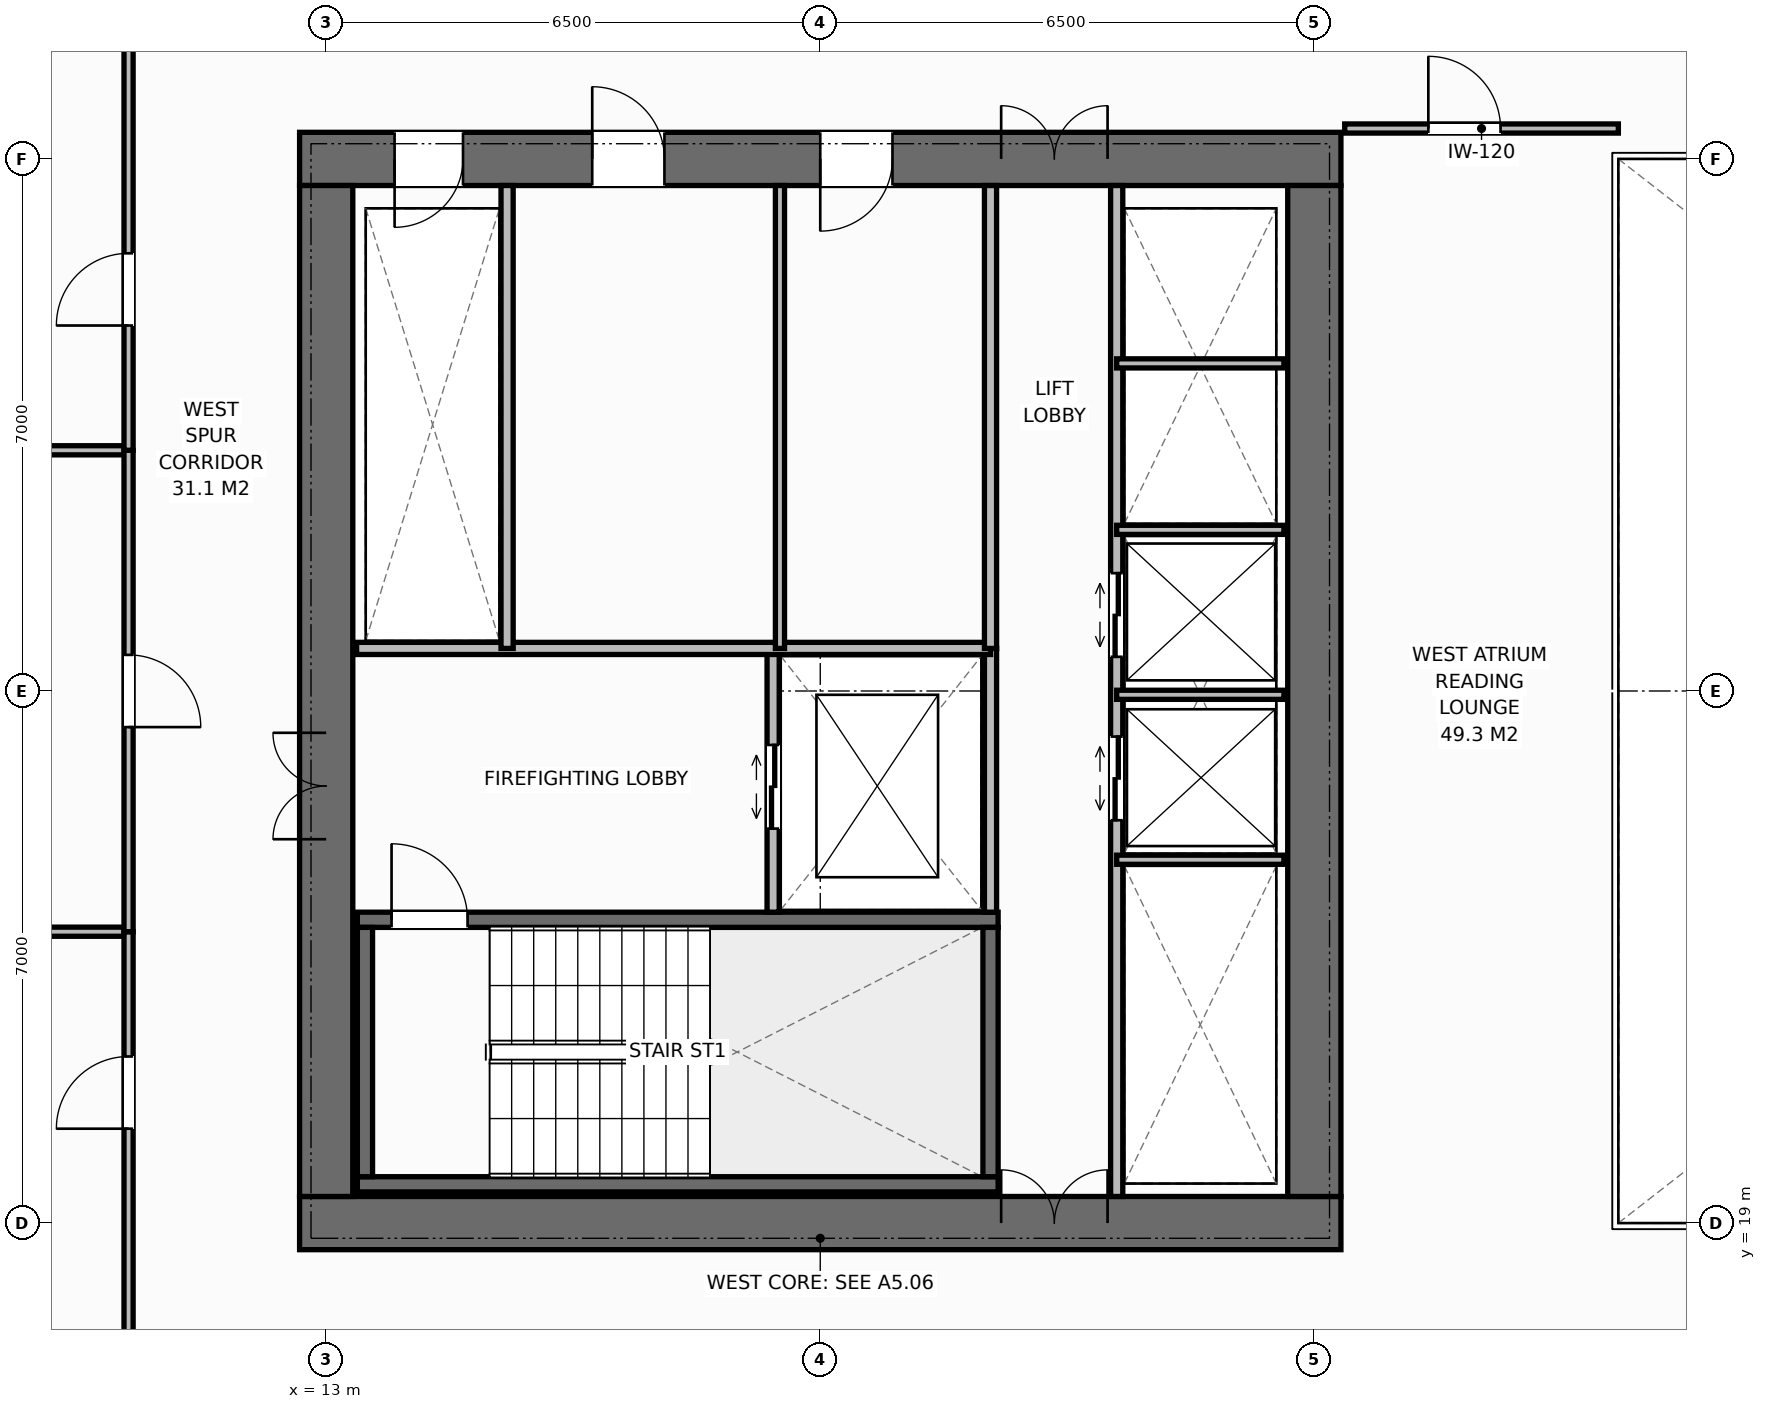
"""IFC4 building model, lengths in metres.
Left out: names, types, materials, properties, quantities, classifications, styles, units other than length and angle.
Written with IfcOpenShell. Run it as: python <this file> out.ifc"""

import sys

from ifc_helpers import new_model, si_unit, direction, frame, frame_2d, origin, place, context, subcontext, project, spatial, rectangle, extrude, element, fill, save


model = new_model("IFC4")
c1 = context("Model", 3, precision=1e-05, world=origin(), true_north=direction((0.0, 1.0)))
c2 = subcontext(c1, "Body", "Model", "MODEL_VIEW")
j1 = project(units=[si_unit("LENGTHUNIT", "METRE"), si_unit("PLANEANGLEUNIT", "RADIAN")], contexts=[c1])
p1 = place(None, origin())
s1 = spatial("IfcSite", under=j1, at=p1, CompositionType="ELEMENT")
p2 = place(p1, origin())
s2 = spatial("IfcBuilding", under=s1, at=p2, CompositionType="ELEMENT")
p3 = place(p2, frame((0.0, 0.0, 89.8)))
s3 = spatial("IfcBuildingStorey", under=s2, at=p3, CompositionType="ELEMENT", Elevation=89.8)
p4 = place(p3, frame((12.65, 19.0, 0.0), z_axis=(0.0, 0.0, 1.0), x_axis=(1.0, 0.0, 0.0)))
e1 = element("IfcWall", 1, at=p4, inside=s3, PredefinedType="SHEAR", context=c2, shape_type="SweptSolid", body=[
    extrude(rectangle(XDim=13.7, YDim=0.7, at=frame_2d((6.85, 0.0))), origin(), (0.0, 0.0, 1.0), 3.8),
])
p5 = place(p4, frame((9.23, 0.0, 0.0)))
e2 = element("IfcOpeningElement", 2, at=p5, cuts=e1, PredefinedType="OPENING", context=c2, shape_type="SweptSolid", body=[
    extrude(rectangle(XDim=1.4, YDim=2.2, at=frame_2d((0.7, 1.1))), frame((0.0, 0.36, 0.0), z_axis=(0.0, -1.0, 0.0), x_axis=(1.0, 0.0, 0.0)), (0.0, 0.0, 1.0), 0.72),
])
p6 = place(p3, frame((12.65, 33.0, 0.0), z_axis=(0.0, 0.0, 1.0), x_axis=(1.0, 0.0, 0.0)))
e3 = element("IfcWall", 3, at=p6, inside=s3, PredefinedType="SHEAR", context=c2, shape_type="SweptSolid", body=[
    extrude(rectangle(XDim=13.7, YDim=0.7, at=frame_2d((6.85, 0.0))), origin(), (0.0, 0.0, 1.0), 3.8),
])
p7 = place(p6, frame((1.25, 0.0, 0.0)))
e4 = element("IfcOpeningElement", 4, at=p7, cuts=e3, PredefinedType="OPENING", context=c2, shape_type="SweptSolid", body=[
    extrude(rectangle(XDim=0.9, YDim=2.15, at=frame_2d((0.45, 1.075))), frame((0.0, 0.36, 0.0), z_axis=(0.0, -1.0, 0.0), x_axis=(1.0, 0.0, 0.0)), (0.0, 0.0, 1.0), 0.72),
])
p8 = place(p6, frame((3.85, 0.0, 0.0)))
e5 = element("IfcOpeningElement", 5, at=p8, cuts=e3, PredefinedType="OPENING", context=c2, shape_type="SweptSolid", body=[
    extrude(rectangle(XDim=0.95, YDim=2.15, at=frame_2d((0.475, 1.075))), frame((0.0, 0.36, 0.0), z_axis=(0.0, -1.0, 0.0), x_axis=(1.0, 0.0, 0.0)), (0.0, 0.0, 1.0), 0.72),
])
p9 = place(p6, frame((6.85, 0.0, 0.0)))
e6 = element("IfcOpeningElement", 6, at=p9, cuts=e3, PredefinedType="OPENING", context=c2, shape_type="SweptSolid", body=[
    extrude(rectangle(XDim=0.95, YDim=2.15, at=frame_2d((0.475, 1.075))), frame((0.0, 0.36, 0.0), z_axis=(0.0, -1.0, 0.0), x_axis=(1.0, 0.0, 0.0)), (0.0, 0.0, 1.0), 0.72),
])
p10 = place(p6, frame((9.23, 0.0, 0.0)))
e7 = element("IfcOpeningElement", 7, at=p10, cuts=e3, PredefinedType="OPENING", context=c2, shape_type="SweptSolid", body=[
    extrude(rectangle(XDim=1.4, YDim=2.2, at=frame_2d((0.7, 1.1))), frame((0.0, 0.36, 0.0), z_axis=(0.0, -1.0, 0.0), x_axis=(1.0, 0.0, 0.0)), (0.0, 0.0, 1.0), 0.72),
])
p11 = place(p3, frame((13.0, 19.35, 0.0), z_axis=(0.0, 0.0, 1.0), x_axis=(0.0, 1.0, 0.0)))
e8 = element("IfcWall", 8, at=p11, inside=s3, PredefinedType="SHEAR", context=c2, shape_type="SweptSolid", body=[
    extrude(rectangle(XDim=13.3, YDim=0.7, at=frame_2d((6.65, 0.0))), origin(), (0.0, 0.0, 1.0), 3.8),
])
p12 = place(p11, frame((4.7, 0.0, 0.0)))
e9 = element("IfcOpeningElement", 9, at=p12, cuts=e8, PredefinedType="OPENING", context=c2, shape_type="SweptSolid", body=[
    extrude(rectangle(XDim=1.4, YDim=2.2, at=frame_2d((0.7, 1.1))), frame((0.0, 0.36, 0.0), z_axis=(0.0, -1.0, 0.0), x_axis=(1.0, 0.0, 0.0)), (0.0, 0.0, 1.0), 0.72),
])
p13 = place(p3, frame((26.0, 19.35, 0.0), z_axis=(0.0, 0.0, 1.0), x_axis=(0.0, 1.0, 0.0)))
e10 = element("IfcWall", 10, at=p13, inside=s3, PredefinedType="SHEAR", context=c2, shape_type="SweptSolid", body=[
    extrude(rectangle(XDim=13.3, YDim=0.7, at=frame_2d((6.65, 0.0))), origin(), (0.0, 0.0, 1.0), 3.8),
])
p14 = place(p3, frame((13.41, 19.51, 0.0), z_axis=(0.0, 0.0, 1.0), x_axis=(1.0, 0.0, 0.0)))
e11 = element("IfcWall", 11, at=p14, inside=s3, PredefinedType="SHEAR", context=c2, shape_type="SweptSolid", body=[
    extrude(rectangle(XDim=8.43, YDim=0.2, at=frame_2d((4.215, 0.0))), origin(), (0.0, 0.0, 1.0), 3.8),
])
p15 = place(p3, frame((13.41, 22.99, 0.0), z_axis=(0.0, 0.0, 1.0), x_axis=(1.0, 0.0, 0.0)))
e12 = element("IfcWall", 12, at=p15, inside=s3, PredefinedType="SHEAR", context=c2, shape_type="SweptSolid", body=[
    extrude(rectangle(XDim=8.43, YDim=0.2, at=frame_2d((4.215, 0.0))), origin(), (0.0, 0.0, 1.0), 3.8),
])
p16 = place(p15, frame((0.45, 0.0, 0.0)))
e13 = element("IfcOpeningElement", 13, at=p16, cuts=e12, PredefinedType="OPENING", context=c2, shape_type="SweptSolid", body=[
    extrude(rectangle(XDim=1.0, YDim=2.15, at=frame_2d((0.5, 1.075))), frame((0.0, 0.11, 0.0), z_axis=(0.0, -1.0, 0.0), x_axis=(1.0, 0.0, 0.0)), (0.0, 0.0, 1.0), 0.22),
])
for number, where, z_axis, x_axis in (
    (14, (13.51, 19.61, 0.0), (0.0, 0.0, 1.0), (0.0, 1.0, 0.0)),
    (15, (21.74, 19.61, 0.0), (0.0, 0.0, 1.0), (0.0, 1.0, 0.0)),
):
    element("IfcWall", number, at=place(p3, frame(where, z_axis=z_axis, x_axis=x_axis)), inside=s3, PredefinedType="SHEAR", context=c2, shape_type="SweptSolid", body=[
        extrude(rectangle(XDim=3.28, YDim=0.2, at=frame_2d((1.64, 0.0))), origin(), (0.0, 0.0, 1.0), 3.8),
    ])
p17 = place(p3, frame((21.74, 23.09, 0.0), z_axis=(0.0, 0.0, 1.0), x_axis=(0.0, 1.0, 0.0)))
e16 = element("IfcWall", 16, at=p17, inside=s3, PredefinedType="STANDARD", context=c2, shape_type="SweptSolid", body=[
    extrude(rectangle(XDim=3.47, YDim=0.16, at=frame_2d((1.735, 0.0))), origin(), (0.0, 0.0, 1.0), 3.565),
])
p18 = place(p3, frame((18.88, 23.09, 0.0), z_axis=(0.0, 0.0, 1.0), x_axis=(0.0, 1.0, 0.0)))
e17 = element("IfcWall", 17, at=p18, inside=s3, PredefinedType="STANDARD", context=c2, shape_type="SweptSolid", body=[
    extrude(rectangle(XDim=3.47, YDim=0.16, at=frame_2d((1.735, 0.0))), origin(), (0.0, 0.0, 1.0), 3.565),
])
p19 = place(p18, frame((1.1, 0.0, 0.0)))
e18 = element("IfcOpeningElement", 18, at=p19, cuts=e17, PredefinedType="OPENING", context=c2, shape_type="SweptSolid", body=[
    extrude(rectangle(XDim=1.1, YDim=2.2, at=frame_2d((0.55, 1.1))), frame((0.0, 0.09, 0.0), z_axis=(0.0, -1.0, 0.0), x_axis=(1.0, 0.0, 0.0)), (0.0, 0.0, 1.0), 0.18),
])
p20 = place(p3, frame((13.4, 26.56, 0.0), z_axis=(0.0, 0.0, 1.0), x_axis=(1.0, 0.0, 0.0)))
e19 = element("IfcWall", 19, at=p20, inside=s3, PredefinedType="STANDARD", context=c2, shape_type="SweptSolid", body=[
    extrude(rectangle(XDim=8.34, YDim=0.16, at=frame_2d((4.17, 0.0))), origin(), (0.0, 0.0, 1.0), 3.565),
])
p21 = place(p3, frame((15.38, 26.56, 0.0), z_axis=(0.0, 0.0, 1.0), x_axis=(0.0, 1.0, 0.0)))
e20 = element("IfcWall", 20, at=p21, inside=s3, PredefinedType="STANDARD", context=c2, shape_type="SweptSolid", body=[
    extrude(rectangle(XDim=6.09, YDim=0.16, at=frame_2d((3.045, 0.0))), origin(), (0.0, 0.0, 1.0), 3.565),
])
p22 = place(p3, frame((18.97, 26.56, 0.0), z_axis=(0.0, 0.0, 1.0), x_axis=(0.0, 1.0, 0.0)))
e21 = element("IfcWall", 21, at=p22, inside=s3, PredefinedType="PARTITIONING", context=c2, shape_type="SweptSolid", body=[
    extrude(rectangle(XDim=6.09, YDim=0.12, at=frame_2d((3.045, 0.0))), origin(), (0.0, 0.0, 1.0), 3.565),
])
p23 = place(p3, frame((21.74, 26.56, 0.0), z_axis=(0.0, 0.0, 1.0), x_axis=(0.0, 1.0, 0.0)))
e22 = element("IfcWall", 22, at=p23, inside=s3, PredefinedType="STANDARD", context=c2, shape_type="SweptSolid", body=[
    extrude(rectangle(XDim=6.09, YDim=0.16, at=frame_2d((3.045, 0.0))), origin(), (0.0, 0.0, 1.0), 3.565),
])
p24 = place(p3, frame((23.4, 19.35, 0.0), z_axis=(0.0, 0.0, 1.0), x_axis=(0.0, 1.0, 0.0)))
e23 = element("IfcWall", 23, at=p24, inside=s3, PredefinedType="STANDARD", context=c2, shape_type="SweptSolid", body=[
    extrude(rectangle(XDim=13.3, YDim=0.16, at=frame_2d((6.65, 0.0))), origin(), (0.0, 0.0, 1.0), 3.565),
])
p25 = place(p24, frame((4.95, 0.0, 0.0)))
e24 = element("IfcOpeningElement", 24, at=p25, cuts=e23, PredefinedType="OPENING", context=c2, shape_type="SweptSolid", body=[
    extrude(rectangle(XDim=1.1, YDim=2.2, at=frame_2d((0.55, 1.1))), frame((0.0, 0.09, 0.0), z_axis=(0.0, -1.0, 0.0), x_axis=(1.0, 0.0, 0.0)), (0.0, 0.0, 1.0), 0.18),
])
p26 = place(p24, frame((7.1, 0.0, 0.0)))
e25 = element("IfcOpeningElement", 25, at=p26, cuts=e23, PredefinedType="OPENING", context=c2, shape_type="SweptSolid", body=[
    extrude(rectangle(XDim=1.1, YDim=2.2, at=frame_2d((0.55, 1.1))), frame((0.0, 0.09, 0.0), z_axis=(0.0, -1.0, 0.0), x_axis=(1.0, 0.0, 0.0)), (0.0, 0.0, 1.0), 0.18),
])
for number, where, z_axis, x_axis in (
    (26, (23.4, 23.78, 0.0), (0.0, 0.0, 1.0), (1.0, 0.0, 0.0)),
    (27, (23.4, 25.95, 0.0), (0.0, 0.0, 1.0), (1.0, 0.0, 0.0)),
    (28, (23.4, 28.12, 0.0), (0.0, 0.0, 1.0), (1.0, 0.0, 0.0)),
    (29, (23.4, 30.31, 0.0), (0.0, 0.0, 1.0), (1.0, 0.0, 0.0)),
):
    element("IfcWall", number, at=place(p3, frame(where, z_axis=z_axis, x_axis=x_axis)), inside=s3, PredefinedType="PARTITIONING", context=c2, shape_type="SweptSolid", body=[
        extrude(rectangle(XDim=2.2, YDim=0.12, at=frame_2d((1.1, 0.0))), origin(), (0.0, 0.0, 1.0), 3.565),
    ])
p27 = place(p3, frame((26.4, 33.4, 0.0), z_axis=(0.0, 0.0, 1.0), x_axis=(1.0, 0.0, 0.0)))
e30 = element("IfcWall", 30, at=p27, inside=s3, PredefinedType="PARTITIONING", context=c2, shape_type="SweptSolid", body=[
    extrude(rectangle(XDim=3.6, YDim=0.12, at=frame_2d((1.8, 0.0))), origin(), (0.0, 0.0, 1.0), 3.565),
])
p28 = place(p27, frame((1.1, 0.0, 0.0)))
e31 = element("IfcOpeningElement", 31, at=p28, cuts=e30, PredefinedType="OPENING", context=c2, shape_type="SweptSolid", body=[
    extrude(rectangle(XDim=0.95, YDim=2.15, at=frame_2d((0.475, 1.075))), frame((0.0, 0.07, 0.0), z_axis=(0.0, -1.0, 0.0), x_axis=(1.0, 0.0, 0.0)), (0.0, 0.0, 1.0), 0.14),
])
p29 = place(p3, frame((1.82, 22.833, 0.0), z_axis=(0.0, 0.0, 1.0), x_axis=(1.0, 0.0, 0.0)))
e32 = element("IfcWall", 32, at=p29, inside=s3, PredefinedType="PARTITIONING", context=c2, shape_type="SweptSolid", body=[
    extrude(rectangle(XDim=8.58, YDim=0.12, at=frame_2d((4.29, 0.0))), origin(), (0.0, 0.0, 1.0), 3.565),
])
p30 = place(p3, frame((10.4, 16.5, 0.0), z_axis=(0.0, 0.0, 1.0), x_axis=(0.0, 1.0, 0.0)))
e33 = element("IfcWall", 33, at=p30, inside=s3, PredefinedType="PARTITIONING", context=c2, shape_type="SweptSolid", body=[
    extrude(rectangle(XDim=6.333, YDim=0.12, at=frame_2d((3.167, 0.0))), origin(), (0.0, 0.0, 1.0), 3.565),
])
p31 = place(p30, frame((3.742, 0.0, 0.0)))
e34 = element("IfcOpeningElement", 34, at=p31, cuts=e33, PredefinedType="OPENING", context=c2, shape_type="SweptSolid", body=[
    extrude(rectangle(XDim=0.95, YDim=2.15, at=frame_2d((0.475, 1.075))), frame((0.0, 0.07, 0.0), z_axis=(0.0, -1.0, 0.0), x_axis=(1.0, 0.0, 0.0)), (0.0, 0.0, 1.0), 0.14),
])
p32 = place(p3, frame((1.82, 29.167, 0.0), z_axis=(0.0, 0.0, 1.0), x_axis=(1.0, 0.0, 0.0)))
e35 = element("IfcWall", 35, at=p32, inside=s3, PredefinedType="PARTITIONING", context=c2, shape_type="SweptSolid", body=[
    extrude(rectangle(XDim=8.58, YDim=0.12, at=frame_2d((4.29, 0.0))), origin(), (0.0, 0.0, 1.0), 3.565),
])
p33 = place(p3, frame((10.4, 22.833, 0.0), z_axis=(0.0, 0.0, 1.0), x_axis=(0.0, 1.0, 0.0)))
e36 = element("IfcWall", 36, at=p33, inside=s3, PredefinedType="PARTITIONING", context=c2, shape_type="SweptSolid", body=[
    extrude(rectangle(XDim=6.333, YDim=0.12, at=frame_2d((3.167, 0.0))), origin(), (0.0, 0.0, 1.0), 3.565),
])
p34 = place(p33, frame((2.692, 0.0, 0.0)))
e37 = element("IfcOpeningElement", 37, at=p34, cuts=e36, PredefinedType="OPENING", context=c2, shape_type="SweptSolid", body=[
    extrude(rectangle(XDim=0.95, YDim=2.15, at=frame_2d((0.475, 1.075))), frame((0.0, 0.07, 0.0), z_axis=(0.0, -1.0, 0.0), x_axis=(1.0, 0.0, 0.0)), (0.0, 0.0, 1.0), 0.14),
])
p35 = place(p3, frame((10.4, 29.167, 0.0), z_axis=(0.0, 0.0, 1.0), x_axis=(0.0, 1.0, 0.0)))
e38 = element("IfcWall", 38, at=p35, inside=s3, PredefinedType="PARTITIONING", context=c2, shape_type="SweptSolid", body=[
    extrude(rectangle(XDim=6.333, YDim=0.12, at=frame_2d((3.167, 0.0))), origin(), (0.0, 0.0, 1.0), 3.565),
])
p36 = place(p35, frame((1.642, 0.0, 0.0)))
e39 = element("IfcOpeningElement", 39, at=p36, cuts=e38, PredefinedType="OPENING", context=c2, shape_type="SweptSolid", body=[
    extrude(rectangle(XDim=0.95, YDim=2.15, at=frame_2d((0.475, 1.075))), frame((0.0, 0.07, 0.0), z_axis=(0.0, -1.0, 0.0), x_axis=(1.0, 0.0, 0.0)), (0.0, 0.0, 1.0), 0.14),
])
p37 = place(p16, origin())
e40 = element("IfcDoor", 40, at=p37, inside=s3, OperationType="SINGLE_SWING_LEFT", PredefinedType="DOOR", context=c2, shape_type="SweptSolid", body=[
    extrude(rectangle(XDim=1.0, YDim=2.15, at=frame_2d((0.5, 1.075))), frame((0.0, 0.025, 0.0), z_axis=(0.0, -1.0, 0.0), x_axis=(1.0, 0.0, 0.0)), (0.0, 0.0, 1.0), 0.05),
])
fill(e13, e40)
p38 = place(p12, origin())
e41 = element("IfcDoor", 41, at=p38, inside=s3, OperationType="DOUBLE_DOOR_SINGLE_SWING", PredefinedType="DOOR", context=c2, shape_type="SweptSolid", body=[
    extrude(rectangle(XDim=1.4, YDim=2.2, at=frame_2d((0.7, 1.1))), frame((0.0, 0.025, 0.0), z_axis=(0.0, -1.0, 0.0), x_axis=(1.0, 0.0, 0.0)), (0.0, 0.0, 1.0), 0.05),
])
fill(e9, e41)
p39 = place(p19, origin())
e42 = element("IfcDoor", 42, at=p39, inside=s3, OperationType="DOUBLE_DOOR_SLIDING", PredefinedType="DOOR", context=c2, shape_type="SweptSolid", body=[
    extrude(rectangle(XDim=1.1, YDim=2.2, at=frame_2d((0.55, 1.1))), frame((0.0, 0.025, 0.0), z_axis=(0.0, -1.0, 0.0), x_axis=(1.0, 0.0, 0.0)), (0.0, 0.0, 1.0), 0.05),
])
fill(e18, e42)
p40 = place(p7, origin())
e43 = element("IfcDoor", 43, at=p40, inside=s3, OperationType="SINGLE_SWING_RIGHT", PredefinedType="DOOR", context=c2, shape_type="SweptSolid", body=[
    extrude(rectangle(XDim=0.9, YDim=2.15, at=frame_2d((0.45, 1.075))), frame((0.0, -0.075, 0.0), z_axis=(0.0, -1.0, 0.0), x_axis=(1.0, 0.0, 0.0)), (0.0, 0.0, 1.0), 0.05),
])
fill(e4, e43)
p41 = place(p8, origin())
e44 = element("IfcDoor", 44, at=p41, inside=s3, OperationType="SINGLE_SWING_LEFT", PredefinedType="DOOR", context=c2, shape_type="SweptSolid", body=[
    extrude(rectangle(XDim=0.95, YDim=2.15, at=frame_2d((0.475, 1.075))), frame((0.0, -0.075, 0.0), z_axis=(0.0, -1.0, 0.0), x_axis=(1.0, 0.0, 0.0)), (0.0, 0.0, 1.0), 0.05),
])
fill(e5, e44)
p42 = place(p9, origin())
e45 = element("IfcDoor", 45, at=p42, inside=s3, OperationType="SINGLE_SWING_RIGHT", PredefinedType="DOOR", context=c2, shape_type="SweptSolid", body=[
    extrude(rectangle(XDim=0.95, YDim=2.15, at=frame_2d((0.475, 1.075))), frame((0.0, -0.075, 0.0), z_axis=(0.0, -1.0, 0.0), x_axis=(1.0, 0.0, 0.0)), (0.0, 0.0, 1.0), 0.05),
])
fill(e6, e45)
p43 = place(p5, origin())
e46 = element("IfcDoor", 46, at=p43, inside=s3, OperationType="DOUBLE_DOOR_SINGLE_SWING", PredefinedType="DOOR", context=c2, shape_type="SweptSolid", body=[
    extrude(rectangle(XDim=1.4, YDim=2.2, at=frame_2d((0.7, 1.1))), frame((0.0, 0.125, 0.0), z_axis=(0.0, -1.0, 0.0), x_axis=(1.0, 0.0, 0.0)), (0.0, 0.0, 1.0), 0.05),
])
fill(e2, e46)
p44 = place(p10, origin())
e47 = element("IfcDoor", 47, at=p44, inside=s3, OperationType="DOUBLE_DOOR_SINGLE_SWING", PredefinedType="DOOR", context=c2, shape_type="SweptSolid", body=[
    extrude(rectangle(XDim=1.4, YDim=2.2, at=frame_2d((0.7, 1.1))), frame((0.0, -0.075, 0.0), z_axis=(0.0, -1.0, 0.0), x_axis=(1.0, 0.0, 0.0)), (0.0, 0.0, 1.0), 0.05),
])
fill(e7, e47)
p45 = place(p25, origin())
e48 = element("IfcDoor", 48, at=p45, inside=s3, OperationType="DOUBLE_DOOR_SLIDING", PredefinedType="DOOR", context=c2, shape_type="SweptSolid", body=[
    extrude(rectangle(XDim=1.1, YDim=2.2, at=frame_2d((0.55, 1.1))), frame((0.0, 0.025, 0.0), z_axis=(0.0, -1.0, 0.0), x_axis=(1.0, 0.0, 0.0)), (0.0, 0.0, 1.0), 0.05),
])
fill(e24, e48)
p46 = place(p26, origin())
e49 = element("IfcDoor", 49, at=p46, inside=s3, OperationType="DOUBLE_DOOR_SLIDING", PredefinedType="DOOR", context=c2, shape_type="SweptSolid", body=[
    extrude(rectangle(XDim=1.1, YDim=2.2, at=frame_2d((0.55, 1.1))), frame((0.0, 0.025, 0.0), z_axis=(0.0, -1.0, 0.0), x_axis=(1.0, 0.0, 0.0)), (0.0, 0.0, 1.0), 0.05),
])
fill(e25, e49)
p47 = place(p28, origin())
e50 = element("IfcDoor", 50, at=p47, inside=s3, OperationType="SINGLE_SWING_LEFT", PredefinedType="DOOR", context=c2, shape_type="SweptSolid", body=[
    extrude(rectangle(XDim=0.95, YDim=2.15, at=frame_2d((0.475, 1.075))), frame((0.0, 0.025, 0.0), z_axis=(0.0, -1.0, 0.0), x_axis=(1.0, 0.0, 0.0)), (0.0, 0.0, 1.0), 0.05),
])
fill(e31, e50)
p48 = place(p31, origin())
e51 = element("IfcDoor", 51, at=p48, inside=s3, OperationType="SINGLE_SWING_LEFT", PredefinedType="DOOR", context=c2, shape_type="SweptSolid", body=[
    extrude(rectangle(XDim=0.95, YDim=2.15, at=frame_2d((0.475, 1.075))), frame((0.0, 0.025, 0.0), z_axis=(0.0, -1.0, 0.0), x_axis=(1.0, 0.0, 0.0)), (0.0, 0.0, 1.0), 0.05),
])
fill(e34, e51)
p49 = place(p34, origin())
e52 = element("IfcDoor", 52, at=p49, inside=s3, OperationType="SINGLE_SWING_RIGHT", PredefinedType="DOOR", context=c2, shape_type="SweptSolid", body=[
    extrude(rectangle(XDim=0.95, YDim=2.15, at=frame_2d((0.475, 1.075))), frame((0.0, 0.025, 0.0), z_axis=(0.0, -1.0, 0.0), x_axis=(1.0, 0.0, 0.0)), (0.0, 0.0, 1.0), 0.05),
])
fill(e37, e52)
p50 = place(p36, origin())
e53 = element("IfcDoor", 53, at=p50, inside=s3, OperationType="SINGLE_SWING_LEFT", PredefinedType="DOOR", context=c2, shape_type="SweptSolid", body=[
    extrude(rectangle(XDim=0.95, YDim=2.15, at=frame_2d((0.475, 1.075))), frame((0.0, 0.025, 0.0), z_axis=(0.0, -1.0, 0.0), x_axis=(1.0, 0.0, 0.0)), (0.0, 0.0, 1.0), 0.05),
])
fill(e39, e53)
save(model, sys.argv[1])
